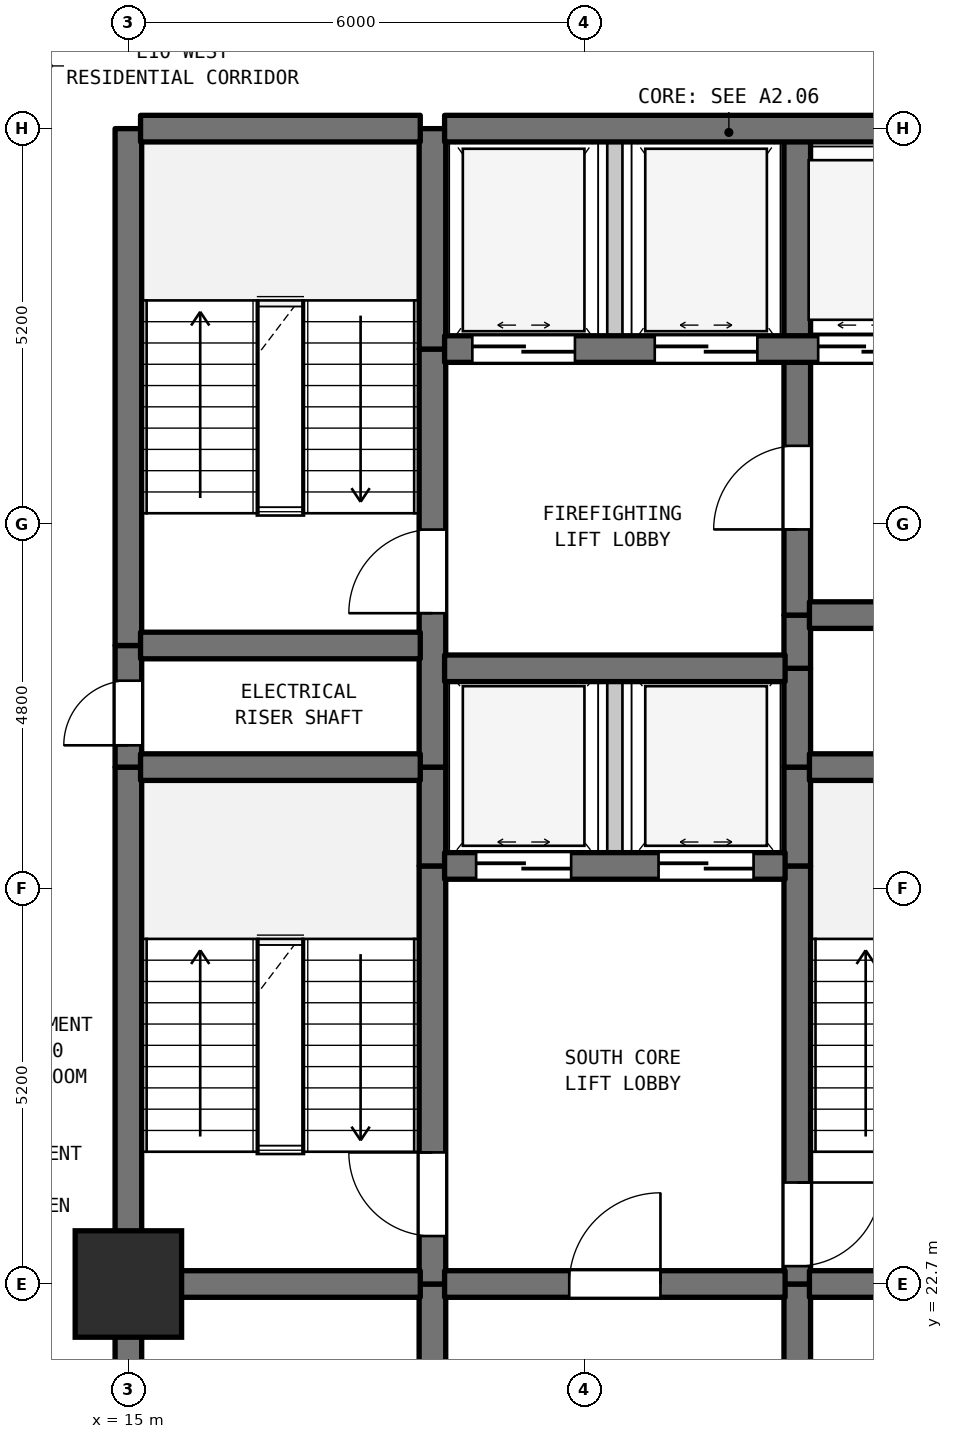
"""IFC4 building model, lengths in metres.
Left out: names, types, materials, properties, quantities, classifications, styles, units other than length and angle.
Written with IfcOpenShell. Run it as: python <this file> out.ifc"""

import sys

from ifc_helpers import new_model, si_unit, direction, frame, frame_2d, origin, origin_2d, place, context, subcontext, project, spatial, rectangle, extrude, element, fill, save


model = new_model("IFC4")
c1 = context("Model", 3, precision=1e-05, world=origin(), true_north=direction((0.0, 1.0)))
c2 = subcontext(c1, "Body", "Model", "MODEL_VIEW")
j1 = project(units=[si_unit("LENGTHUNIT", "METRE"), si_unit("PLANEANGLEUNIT", "RADIAN")], contexts=[c1])
p1 = place(None, origin())
s1 = spatial("IfcSite", under=j1, at=p1, CompositionType="ELEMENT")
p2 = place(p1, origin())
s2 = spatial("IfcBuilding", under=s1, at=p2, CompositionType="ELEMENT")
p3 = place(p2, frame((0.0, 0.0, 46.2)))
s3 = spatial("IfcBuildingStorey", under=s2, at=p3, CompositionType="ELEMENT", Elevation=46.2)
p4 = place(p3, frame((15.0, 22.7, 0.0), z_axis=(0.0, 0.0, 1.0), x_axis=(1.0, 0.0, 0.0)))
e1 = element("IfcColumn", 1, at=p4, inside=s3, PredefinedType="COLUMN", context=c2, shape_type="SweptSolid", body=[
    extrude(rectangle(XDim=1.4, YDim=1.4, at=origin_2d()), origin(), (0.0, 0.0, 1.0), 3.7),
])
p5 = place(p3, frame((15.0, 19.5, 0.0), z_axis=(0.0, 0.0, 1.0), x_axis=(0.0, 1.0, 0.0)))
e2 = element("IfcWall", 2, at=p5, inside=s3, PredefinedType="SHEAR", context=c2, shape_type="SweptSolid", body=[
    extrude(rectangle(XDim=3.2, YDim=0.35, at=frame_2d((1.6, 0.0))), origin(), (0.0, 0.0, 1.0), 3.385),
])
p6 = place(p3, frame((15.0, 22.7, 0.0), z_axis=(0.0, 0.0, 1.0), x_axis=(0.0, 1.0, 0.0)))
e3 = element("IfcWall", 3, at=p6, inside=s3, PredefinedType="SHEAR", context=c2, shape_type="SweptSolid", body=[
    extrude(rectangle(XDim=6.8, YDim=0.35, at=frame_2d((3.4, 0.0))), origin(), (0.0, 0.0, 1.0), 3.385),
])
p7 = place(p3, frame((15.0, 29.5, 0.0), z_axis=(0.0, 0.0, 1.0), x_axis=(0.0, 1.0, 0.0)))
e4 = element("IfcWall", 4, at=p7, inside=s3, PredefinedType="SHEAR", context=c2, shape_type="SweptSolid", body=[
    extrude(rectangle(XDim=1.6, YDim=0.35, at=frame_2d((0.8, 0.0))), origin(), (0.0, 0.0, 1.0), 3.385),
])
p8 = place(p7, frame((0.287, 0.0, 0.0)))
e5 = element("IfcOpeningElement", 5, at=p8, cuts=e4, PredefinedType="OPENING", context=c2, shape_type="SweptSolid", body=[
    extrude(rectangle(XDim=0.85, YDim=2.1, at=frame_2d((0.425, 1.05))), frame((0.0, 0.185, 0.0), z_axis=(0.0, -1.0, 0.0), x_axis=(1.0, 0.0, 0.0)), (0.0, 0.0, 1.0), 0.37),
])
p9 = place(p3, frame((15.0, 31.1, 0.0), z_axis=(0.0, 0.0, 1.0), x_axis=(0.0, 1.0, 0.0)))
e6 = element("IfcWall", 6, at=p9, inside=s3, PredefinedType="SHEAR", context=c2, shape_type="SweptSolid", body=[
    extrude(rectangle(XDim=6.8, YDim=0.35, at=frame_2d((3.4, 0.0))), origin(), (0.0, 0.0, 1.0), 3.385),
])
p10 = place(p3, frame((19.0, 19.5, 0.0), z_axis=(0.0, 0.0, 1.0), x_axis=(0.0, 1.0, 0.0)))
e7 = element("IfcWall", 7, at=p10, inside=s3, PredefinedType="SHEAR", context=c2, shape_type="SweptSolid", body=[
    extrude(rectangle(XDim=3.2, YDim=0.35, at=frame_2d((1.6, 0.0))), origin(), (0.0, 0.0, 1.0), 3.385),
])
p11 = place(p3, frame((19.0, 22.7, 0.0), z_axis=(0.0, 0.0, 1.0), x_axis=(0.0, 1.0, 0.0)))
e8 = element("IfcWall", 8, at=p11, inside=s3, PredefinedType="SHEAR", context=c2, shape_type="SweptSolid", body=[
    extrude(rectangle(XDim=5.5, YDim=0.35, at=frame_2d((2.75, 0.0))), origin(), (0.0, 0.0, 1.0), 3.385),
])
p12 = place(p11, frame((0.631, 0.0, 0.0)))
e9 = element("IfcOpeningElement", 9, at=p12, cuts=e8, PredefinedType="OPENING", context=c2, shape_type="SweptSolid", body=[
    extrude(rectangle(XDim=1.1, YDim=2.15, at=frame_2d((0.55, 1.075))), frame((0.0, 0.185, 0.0), z_axis=(0.0, -1.0, 0.0), x_axis=(1.0, 0.0, 0.0)), (0.0, 0.0, 1.0), 0.37),
])
p13 = place(p3, frame((19.0, 28.2, 0.0), z_axis=(0.0, 0.0, 1.0), x_axis=(0.0, 1.0, 0.0)))
e10 = element("IfcWall", 10, at=p13, inside=s3, PredefinedType="SHEAR", context=c2, shape_type="SweptSolid", body=[
    extrude(rectangle(XDim=1.3, YDim=0.35, at=frame_2d((0.65, 0.0))), origin(), (0.0, 0.0, 1.0), 3.385),
])
p14 = place(p3, frame((19.0, 29.5, 0.0), z_axis=(0.0, 0.0, 1.0), x_axis=(0.0, 1.0, 0.0)))
e11 = element("IfcWall", 11, at=p14, inside=s3, PredefinedType="SHEAR", context=c2, shape_type="SweptSolid", body=[
    extrude(rectangle(XDim=5.5, YDim=0.35, at=frame_2d((2.75, 0.0))), origin(), (0.0, 0.0, 1.0), 3.385),
])
p15 = place(p14, frame((2.025, 0.0, 0.0)))
e12 = element("IfcOpeningElement", 12, at=p15, cuts=e11, PredefinedType="OPENING", context=c2, shape_type="SweptSolid", body=[
    extrude(rectangle(XDim=1.1, YDim=2.15, at=frame_2d((0.55, 1.075))), frame((0.0, 0.185, 0.0), z_axis=(0.0, -1.0, 0.0), x_axis=(1.0, 0.0, 0.0)), (0.0, 0.0, 1.0), 0.37),
])
p16 = place(p3, frame((19.0, 35.0, 0.0), z_axis=(0.0, 0.0, 1.0), x_axis=(0.0, 1.0, 0.0)))
e13 = element("IfcWall", 13, at=p16, inside=s3, PredefinedType="SHEAR", context=c2, shape_type="SweptSolid", body=[
    extrude(rectangle(XDim=2.9, YDim=0.35, at=frame_2d((1.45, 0.0))), origin(), (0.0, 0.0, 1.0), 3.385),
])
p17 = place(p3, frame((21.4, 28.2, 0.0), z_axis=(0.0, 0.0, 1.0), x_axis=(0.0, 1.0, 0.0)))
e14 = element("IfcWall", 14, at=p17, inside=s3, PredefinedType="STANDARD", context=c2, shape_type="SweptSolid", body=[
    extrude(rectangle(XDim=2.6, YDim=0.2, at=frame_2d((1.3, 0.0))), origin(), (0.0, 0.0, 1.0), 3.385),
])
p18 = place(p3, frame((21.4, 35.0, 0.0), z_axis=(0.0, 0.0, 1.0), x_axis=(0.0, 1.0, 0.0)))
e15 = element("IfcWall", 15, at=p18, inside=s3, PredefinedType="STANDARD", context=c2, shape_type="SweptSolid", body=[
    extrude(rectangle(XDim=2.9, YDim=0.2, at=frame_2d((1.45, 0.0))), origin(), (0.0, 0.0, 1.0), 3.385),
])
p19 = place(p3, frame((23.8, 19.5, 0.0), z_axis=(0.0, 0.0, 1.0), x_axis=(0.0, 1.0, 0.0)))
e16 = element("IfcWall", 16, at=p19, inside=s3, PredefinedType="SHEAR", context=c2, shape_type="SweptSolid", body=[
    extrude(rectangle(XDim=3.2, YDim=0.35, at=frame_2d((1.6, 0.0))), origin(), (0.0, 0.0, 1.0), 3.385),
])
p20 = place(p3, frame((23.8, 22.7, 0.0), z_axis=(0.0, 0.0, 1.0), x_axis=(0.0, 1.0, 0.0)))
e17 = element("IfcWall", 17, at=p20, inside=s3, PredefinedType="SHEAR", context=c2, shape_type="SweptSolid", body=[
    extrude(rectangle(XDim=5.5, YDim=0.35, at=frame_2d((2.75, 0.0))), origin(), (0.0, 0.0, 1.0), 3.385),
])
p21 = place(p20, frame((0.235, 0.0, 0.0)))
e18 = element("IfcOpeningElement", 18, at=p21, cuts=e17, PredefinedType="OPENING", context=c2, shape_type="SweptSolid", body=[
    extrude(rectangle(XDim=1.1, YDim=2.15, at=frame_2d((0.55, 1.075))), frame((0.0, 0.185, 0.0), z_axis=(0.0, -1.0, 0.0), x_axis=(1.0, 0.0, 0.0)), (0.0, 0.0, 1.0), 0.37),
])
for number, where, z_axis, x_axis in (
    (19, (23.8, 28.2, 0.0), (0.0, 0.0, 1.0), (0.0, 1.0, 0.0)),
    (20, (23.8, 29.5, 0.0), (0.0, 0.0, 1.0), (0.0, 1.0, 0.0)),
):
    element("IfcWall", number, at=place(p3, frame(where, z_axis=z_axis, x_axis=x_axis)), inside=s3, PredefinedType="SHEAR", context=c2, shape_type="SweptSolid", body=[
        extrude(rectangle(XDim=1.3, YDim=0.35, at=frame_2d((0.65, 0.0))), origin(), (0.0, 0.0, 1.0), 3.385),
    ])
p22 = place(p3, frame((23.8, 30.8, 0.0), z_axis=(0.0, 0.0, 1.0), x_axis=(0.0, 1.0, 0.0)))
e21 = element("IfcWall", 21, at=p22, inside=s3, PredefinedType="SHEAR", context=c2, shape_type="SweptSolid", body=[
    extrude(rectangle(XDim=0.7, YDim=0.35, at=frame_2d((0.35, 0.0))), origin(), (0.0, 0.0, 1.0), 3.385),
])
p23 = place(p3, frame((23.8, 31.5, 0.0), z_axis=(0.0, 0.0, 1.0), x_axis=(0.0, 1.0, 0.0)))
e22 = element("IfcWall", 22, at=p23, inside=s3, PredefinedType="SHEAR", context=c2, shape_type="SweptSolid", body=[
    extrude(rectangle(XDim=3.5, YDim=0.35, at=frame_2d((1.75, 0.0))), origin(), (0.0, 0.0, 1.0), 3.385),
])
p24 = place(p23, frame((1.127, 0.0, 0.0)))
e23 = element("IfcOpeningElement", 23, at=p24, cuts=e22, PredefinedType="OPENING", context=c2, shape_type="SweptSolid", body=[
    extrude(rectangle(XDim=1.1, YDim=2.15, at=frame_2d((0.55, 1.075))), frame((0.0, 0.185, 0.0), z_axis=(0.0, -1.0, 0.0), x_axis=(1.0, 0.0, 0.0)), (0.0, 0.0, 1.0), 0.37),
])
p25 = place(p3, frame((23.8, 35.0, 0.0), z_axis=(0.0, 0.0, 1.0), x_axis=(0.0, 1.0, 0.0)))
e24 = element("IfcWall", 24, at=p25, inside=s3, PredefinedType="SHEAR", context=c2, shape_type="SweptSolid", body=[
    extrude(rectangle(XDim=2.9, YDim=0.35, at=frame_2d((1.45, 0.0))), origin(), (0.0, 0.0, 1.0), 3.385),
])
p26 = place(p3, frame((15.16, 22.7, 0.0), z_axis=(0.0, 0.0, 1.0), x_axis=(1.0, 0.0, 0.0)))
e25 = element("IfcWall", 25, at=p26, inside=s3, PredefinedType="SHEAR", context=c2, shape_type="SweptSolid", body=[
    extrude(rectangle(XDim=3.68, YDim=0.35, at=frame_2d((1.84, 0.0))), origin(), (0.0, 0.0, 1.0), 3.385),
])
p27 = place(p3, frame((19.16, 22.7, 0.0), z_axis=(0.0, 0.0, 1.0), x_axis=(1.0, 0.0, 0.0)))
e26 = element("IfcWall", 26, at=p27, inside=s3, PredefinedType="SHEAR", context=c2, shape_type="SweptSolid", body=[
    extrude(rectangle(XDim=4.48, YDim=0.35, at=frame_2d((2.24, 0.0))), origin(), (0.0, 0.0, 1.0), 3.385),
])
p28 = place(p27, frame((1.64, 0.0, 0.0)))
e27 = element("IfcOpeningElement", 27, at=p28, cuts=e26, PredefinedType="OPENING", context=c2, shape_type="SweptSolid", body=[
    extrude(rectangle(XDim=1.2, YDim=2.2, at=frame_2d((0.6, 1.1))), frame((0.0, 0.185, 0.0), z_axis=(0.0, -1.0, 0.0), x_axis=(1.0, 0.0, 0.0)), (0.0, 0.0, 1.0), 0.37),
])
p29 = place(p3, frame((23.96, 22.7, 0.0), z_axis=(0.0, 0.0, 1.0), x_axis=(1.0, 0.0, 0.0)))
e28 = element("IfcWall", 28, at=p29, inside=s3, PredefinedType="SHEAR", context=c2, shape_type="SweptSolid", body=[
    extrude(rectangle(XDim=1.855, YDim=0.35, at=frame_2d((0.927, 0.0))), origin(), (0.0, 0.0, 1.0), 3.385),
])
p30 = place(p3, frame((19.16, 28.2, 0.0), z_axis=(0.0, 0.0, 1.0), x_axis=(1.0, 0.0, 0.0)))
e29 = element("IfcWall", 29, at=p30, inside=s3, PredefinedType="SHEAR", context=c2, shape_type="SweptSolid", body=[
    extrude(rectangle(XDim=4.48, YDim=0.35, at=frame_2d((2.24, 0.0))), origin(), (0.0, 0.0, 1.0), 3.385),
])
p31 = place(p30, frame((0.415, 0.0, 0.0)))
e30 = element("IfcOpeningElement", 30, at=p31, cuts=e29, PredefinedType="OPENING", context=c2, shape_type="SweptSolid", body=[
    extrude(rectangle(XDim=1.25, YDim=2.2, at=frame_2d((0.625, 1.1))), frame((0.0, 0.185, 0.0), z_axis=(0.0, -1.0, 0.0), x_axis=(1.0, 0.0, 0.0)), (0.0, 0.0, 1.0), 0.37),
])
p32 = place(p30, frame((2.815, 0.0, 0.0)))
e31 = element("IfcOpeningElement", 31, at=p32, cuts=e29, PredefinedType="OPENING", context=c2, shape_type="SweptSolid", body=[
    extrude(rectangle(XDim=1.25, YDim=2.2, at=frame_2d((0.625, 1.1))), frame((0.0, 0.185, 0.0), z_axis=(0.0, -1.0, 0.0), x_axis=(1.0, 0.0, 0.0)), (0.0, 0.0, 1.0), 0.37),
])
p33 = place(p3, frame((15.16, 29.5, 0.0), z_axis=(0.0, 0.0, 1.0), x_axis=(1.0, 0.0, 0.0)))
e32 = element("IfcWall", 32, at=p33, inside=s3, PredefinedType="SHEAR", context=c2, shape_type="SweptSolid", body=[
    extrude(rectangle(XDim=3.68, YDim=0.35, at=frame_2d((1.84, 0.0))), origin(), (0.0, 0.0, 1.0), 3.385),
])
p34 = place(p3, frame((23.96, 29.5, 0.0), z_axis=(0.0, 0.0, 1.0), x_axis=(1.0, 0.0, 0.0)))
e33 = element("IfcWall", 33, at=p34, inside=s3, PredefinedType="SHEAR", context=c2, shape_type="SweptSolid", body=[
    extrude(rectangle(XDim=3.18, YDim=0.35, at=frame_2d((1.59, 0.0))), origin(), (0.0, 0.0, 1.0), 3.385),
])
p35 = place(p3, frame((19.16, 30.8, 0.0), z_axis=(0.0, 0.0, 1.0), x_axis=(1.0, 0.0, 0.0)))
e34 = element("IfcWall", 34, at=p35, inside=s3, PredefinedType="SHEAR", context=c2, shape_type="SweptSolid", body=[
    extrude(rectangle(XDim=4.48, YDim=0.35, at=frame_2d((2.24, 0.0))), origin(), (0.0, 0.0, 1.0), 3.385),
])
p36 = place(p3, frame((15.16, 31.1, 0.0), z_axis=(0.0, 0.0, 1.0), x_axis=(1.0, 0.0, 0.0)))
e35 = element("IfcWall", 35, at=p36, inside=s3, PredefinedType="SHEAR", context=c2, shape_type="SweptSolid", body=[
    extrude(rectangle(XDim=3.68, YDim=0.35, at=frame_2d((1.84, 0.0))), origin(), (0.0, 0.0, 1.0), 3.385),
])
p37 = place(p3, frame((23.96, 31.5, 0.0), z_axis=(0.0, 0.0, 1.0), x_axis=(1.0, 0.0, 0.0)))
e36 = element("IfcWall", 36, at=p37, inside=s3, PredefinedType="SHEAR", context=c2, shape_type="SweptSolid", body=[
    extrude(rectangle(XDim=3.18, YDim=0.35, at=frame_2d((1.59, 0.0))), origin(), (0.0, 0.0, 1.0), 3.385),
])
p38 = place(p37, frame((1.094, 0.0, 0.0)))
e37 = element("IfcOpeningElement", 37, at=p38, cuts=e36, PredefinedType="OPENING", context=c2, shape_type="SweptSolid", body=[
    extrude(rectangle(XDim=0.85, YDim=2.1, at=frame_2d((0.425, 1.05))), frame((0.0, 0.185, 0.0), z_axis=(0.0, -1.0, 0.0), x_axis=(1.0, 0.0, 0.0)), (0.0, 0.0, 1.0), 0.37),
])
p39 = place(p3, frame((19.16, 35.0, 0.0), z_axis=(0.0, 0.0, 1.0), x_axis=(1.0, 0.0, 0.0)))
e38 = element("IfcWall", 38, at=p39, inside=s3, PredefinedType="SHEAR", context=c2, shape_type="SweptSolid", body=[
    extrude(rectangle(XDim=11.48, YDim=0.35, at=frame_2d((5.74, 0.0))), origin(), (0.0, 0.0, 1.0), 3.385),
])
p40 = place(p39, frame((0.365, 0.0, 0.0)))
e39 = element("IfcOpeningElement", 39, at=p40, cuts=e38, PredefinedType="OPENING", context=c2, shape_type="SweptSolid", body=[
    extrude(rectangle(XDim=1.35, YDim=2.2, at=frame_2d((0.675, 1.1))), frame((0.0, 0.185, 0.0), z_axis=(0.0, -1.0, 0.0), x_axis=(1.0, 0.0, 0.0)), (0.0, 0.0, 1.0), 0.37),
])
p41 = place(p39, frame((2.765, 0.0, 0.0)))
e40 = element("IfcOpeningElement", 40, at=p41, cuts=e38, PredefinedType="OPENING", context=c2, shape_type="SweptSolid", body=[
    extrude(rectangle(XDim=1.35, YDim=2.2, at=frame_2d((0.675, 1.1))), frame((0.0, 0.185, 0.0), z_axis=(0.0, -1.0, 0.0), x_axis=(1.0, 0.0, 0.0)), (0.0, 0.0, 1.0), 0.37),
])
p42 = place(p39, frame((4.915, 0.0, 0.0)))
e41 = element("IfcOpeningElement", 41, at=p42, cuts=e38, PredefinedType="OPENING", context=c2, shape_type="SweptSolid", body=[
    extrude(rectangle(XDim=1.2, YDim=2.2, at=frame_2d((0.6, 1.1))), frame((0.0, 0.185, 0.0), z_axis=(0.0, -1.0, 0.0), x_axis=(1.0, 0.0, 0.0)), (0.0, 0.0, 1.0), 0.37),
])
p43 = place(p39, frame((6.665, 0.0, 0.0)))
e42 = element("IfcOpeningElement", 42, at=p43, cuts=e38, PredefinedType="OPENING", context=c2, shape_type="SweptSolid", body=[
    extrude(rectangle(XDim=1.2, YDim=2.2, at=frame_2d((0.6, 1.1))), frame((0.0, 0.185, 0.0), z_axis=(0.0, -1.0, 0.0), x_axis=(1.0, 0.0, 0.0)), (0.0, 0.0, 1.0), 0.37),
])
p44 = place(p39, frame((8.415, 0.0, 0.0)))
e43 = element("IfcOpeningElement", 43, at=p44, cuts=e38, PredefinedType="OPENING", context=c2, shape_type="SweptSolid", body=[
    extrude(rectangle(XDim=1.2, YDim=2.2, at=frame_2d((0.6, 1.1))), frame((0.0, 0.185, 0.0), z_axis=(0.0, -1.0, 0.0), x_axis=(1.0, 0.0, 0.0)), (0.0, 0.0, 1.0), 0.37),
])
p45 = place(p39, frame((10.16, 0.0, 0.0)))
e44 = element("IfcOpeningElement", 44, at=p45, cuts=e38, PredefinedType="OPENING", context=c2, shape_type="SweptSolid", body=[
    extrude(rectangle(XDim=1.2, YDim=2.2, at=frame_2d((0.6, 1.1))), frame((0.0, 0.185, 0.0), z_axis=(0.0, -1.0, 0.0), x_axis=(1.0, 0.0, 0.0)), (0.0, 0.0, 1.0), 0.37),
])
p46 = place(p3, frame((15.16, 37.9, 0.0), z_axis=(0.0, 0.0, 1.0), x_axis=(1.0, 0.0, 0.0)))
e45 = element("IfcWall", 45, at=p46, inside=s3, PredefinedType="SHEAR", context=c2, shape_type="SweptSolid", body=[
    extrude(rectangle(XDim=3.68, YDim=0.35, at=frame_2d((1.84, 0.0))), origin(), (0.0, 0.0, 1.0), 3.385),
])
p47 = place(p3, frame((19.16, 37.9, 0.0), z_axis=(0.0, 0.0, 1.0), x_axis=(1.0, 0.0, 0.0)))
e46 = element("IfcWall", 46, at=p47, inside=s3, PredefinedType="SHEAR", context=c2, shape_type="SweptSolid", body=[
    extrude(rectangle(XDim=11.48, YDim=0.35, at=frame_2d((5.74, 0.0))), origin(), (0.0, 0.0, 1.0), 3.385),
])
p48 = place(p8, origin())
e47 = element("IfcDoor", 47, at=p48, inside=s3, OperationType="SINGLE_SWING_LEFT", PredefinedType="DOOR", context=c2, shape_type="SweptSolid", body=[
    extrude(rectangle(XDim=0.85, YDim=2.1, at=frame_2d((0.425, 1.05))), frame((0.0, 0.025, 0.0), z_axis=(0.0, -1.0, 0.0), x_axis=(1.0, 0.0, 0.0)), (0.0, 0.0, 1.0), 0.05),
])
fill(e5, e47)
p49 = place(p12, origin())
e48 = element("IfcDoor", 48, at=p49, inside=s3, OperationType="SINGLE_SWING_RIGHT", PredefinedType="DOOR", context=c2, shape_type="SweptSolid", body=[
    extrude(rectangle(XDim=1.1, YDim=2.15, at=frame_2d((0.55, 1.075))), frame((0.0, 0.025, 0.0), z_axis=(0.0, -1.0, 0.0), x_axis=(1.0, 0.0, 0.0)), (0.0, 0.0, 1.0), 0.05),
])
fill(e9, e48)
p50 = place(p15, origin())
e49 = element("IfcDoor", 49, at=p50, inside=s3, OperationType="SINGLE_SWING_LEFT", PredefinedType="DOOR", context=c2, shape_type="SweptSolid", body=[
    extrude(rectangle(XDim=1.1, YDim=2.15, at=frame_2d((0.55, 1.075))), frame((0.0, 0.025, 0.0), z_axis=(0.0, -1.0, 0.0), x_axis=(1.0, 0.0, 0.0)), (0.0, 0.0, 1.0), 0.05),
])
fill(e12, e49)
p51 = place(p21, frame((1.1, 0.0, 0.0), z_axis=(0.0, 0.0, 1.0), x_axis=(-1.0, 0.0, 0.0)))
e50 = element("IfcDoor", 50, at=p51, inside=s3, OperationType="SINGLE_SWING_RIGHT", PredefinedType="DOOR", context=c2, shape_type="SweptSolid", body=[
    extrude(rectangle(XDim=1.1, YDim=2.15, at=frame_2d((0.55, 1.075))), frame((0.0, 0.025, 0.0), z_axis=(0.0, -1.0, 0.0), x_axis=(1.0, 0.0, 0.0)), (0.0, 0.0, 1.0), 0.05),
])
fill(e18, e50)
p52 = place(p24, origin())
e51 = element("IfcDoor", 51, at=p52, inside=s3, OperationType="SINGLE_SWING_LEFT", PredefinedType="DOOR", context=c2, shape_type="SweptSolid", body=[
    extrude(rectangle(XDim=1.1, YDim=2.15, at=frame_2d((0.55, 1.075))), frame((0.0, 0.025, 0.0), z_axis=(0.0, -1.0, 0.0), x_axis=(1.0, 0.0, 0.0)), (0.0, 0.0, 1.0), 0.05),
])
fill(e23, e51)
p53 = place(p28, origin())
e52 = element("IfcDoor", 52, at=p53, inside=s3, OperationType="SINGLE_SWING_RIGHT", PredefinedType="DOOR", context=c2, shape_type="SweptSolid", body=[
    extrude(rectangle(XDim=1.2, YDim=2.2, at=frame_2d((0.6, 1.1))), frame((0.0, 0.025, 0.0), z_axis=(0.0, -1.0, 0.0), x_axis=(1.0, 0.0, 0.0)), (0.0, 0.0, 1.0), 0.05),
])
fill(e27, e52)
p54 = place(p31, origin())
e53 = element("IfcDoor", 53, at=p54, inside=s3, OperationType="DOUBLE_DOOR_SLIDING", PredefinedType="DOOR", context=c2, shape_type="SweptSolid", body=[
    extrude(rectangle(XDim=1.25, YDim=2.2, at=frame_2d((0.625, 1.1))), frame((0.0, 0.025, 0.0), z_axis=(0.0, -1.0, 0.0), x_axis=(1.0, 0.0, 0.0)), (0.0, 0.0, 1.0), 0.05),
])
fill(e30, e53)
p55 = place(p32, origin())
e54 = element("IfcDoor", 54, at=p55, inside=s3, OperationType="DOUBLE_DOOR_SLIDING", PredefinedType="DOOR", context=c2, shape_type="SweptSolid", body=[
    extrude(rectangle(XDim=1.25, YDim=2.2, at=frame_2d((0.625, 1.1))), frame((0.0, 0.025, 0.0), z_axis=(0.0, -1.0, 0.0), x_axis=(1.0, 0.0, 0.0)), (0.0, 0.0, 1.0), 0.05),
])
fill(e31, e54)
p56 = place(p40, origin())
e55 = element("IfcDoor", 55, at=p56, inside=s3, OperationType="DOUBLE_DOOR_SLIDING", PredefinedType="DOOR", context=c2, shape_type="SweptSolid", body=[
    extrude(rectangle(XDim=1.35, YDim=2.2, at=frame_2d((0.675, 1.1))), frame((0.0, 0.025, 0.0), z_axis=(0.0, -1.0, 0.0), x_axis=(1.0, 0.0, 0.0)), (0.0, 0.0, 1.0), 0.05),
])
fill(e39, e55)
p57 = place(p41, origin())
e56 = element("IfcDoor", 56, at=p57, inside=s3, OperationType="DOUBLE_DOOR_SLIDING", PredefinedType="DOOR", context=c2, shape_type="SweptSolid", body=[
    extrude(rectangle(XDim=1.35, YDim=2.2, at=frame_2d((0.675, 1.1))), frame((0.0, 0.025, 0.0), z_axis=(0.0, -1.0, 0.0), x_axis=(1.0, 0.0, 0.0)), (0.0, 0.0, 1.0), 0.05),
])
fill(e40, e56)
p58 = place(p42, origin())
e57 = element("IfcDoor", 57, at=p58, inside=s3, OperationType="DOUBLE_DOOR_SLIDING", PredefinedType="DOOR", context=c2, shape_type="SweptSolid", body=[
    extrude(rectangle(XDim=1.2, YDim=2.2, at=frame_2d((0.6, 1.1))), frame((0.0, 0.025, 0.0), z_axis=(0.0, -1.0, 0.0), x_axis=(1.0, 0.0, 0.0)), (0.0, 0.0, 1.0), 0.05),
])
fill(e41, e57)
save(model, sys.argv[1])
